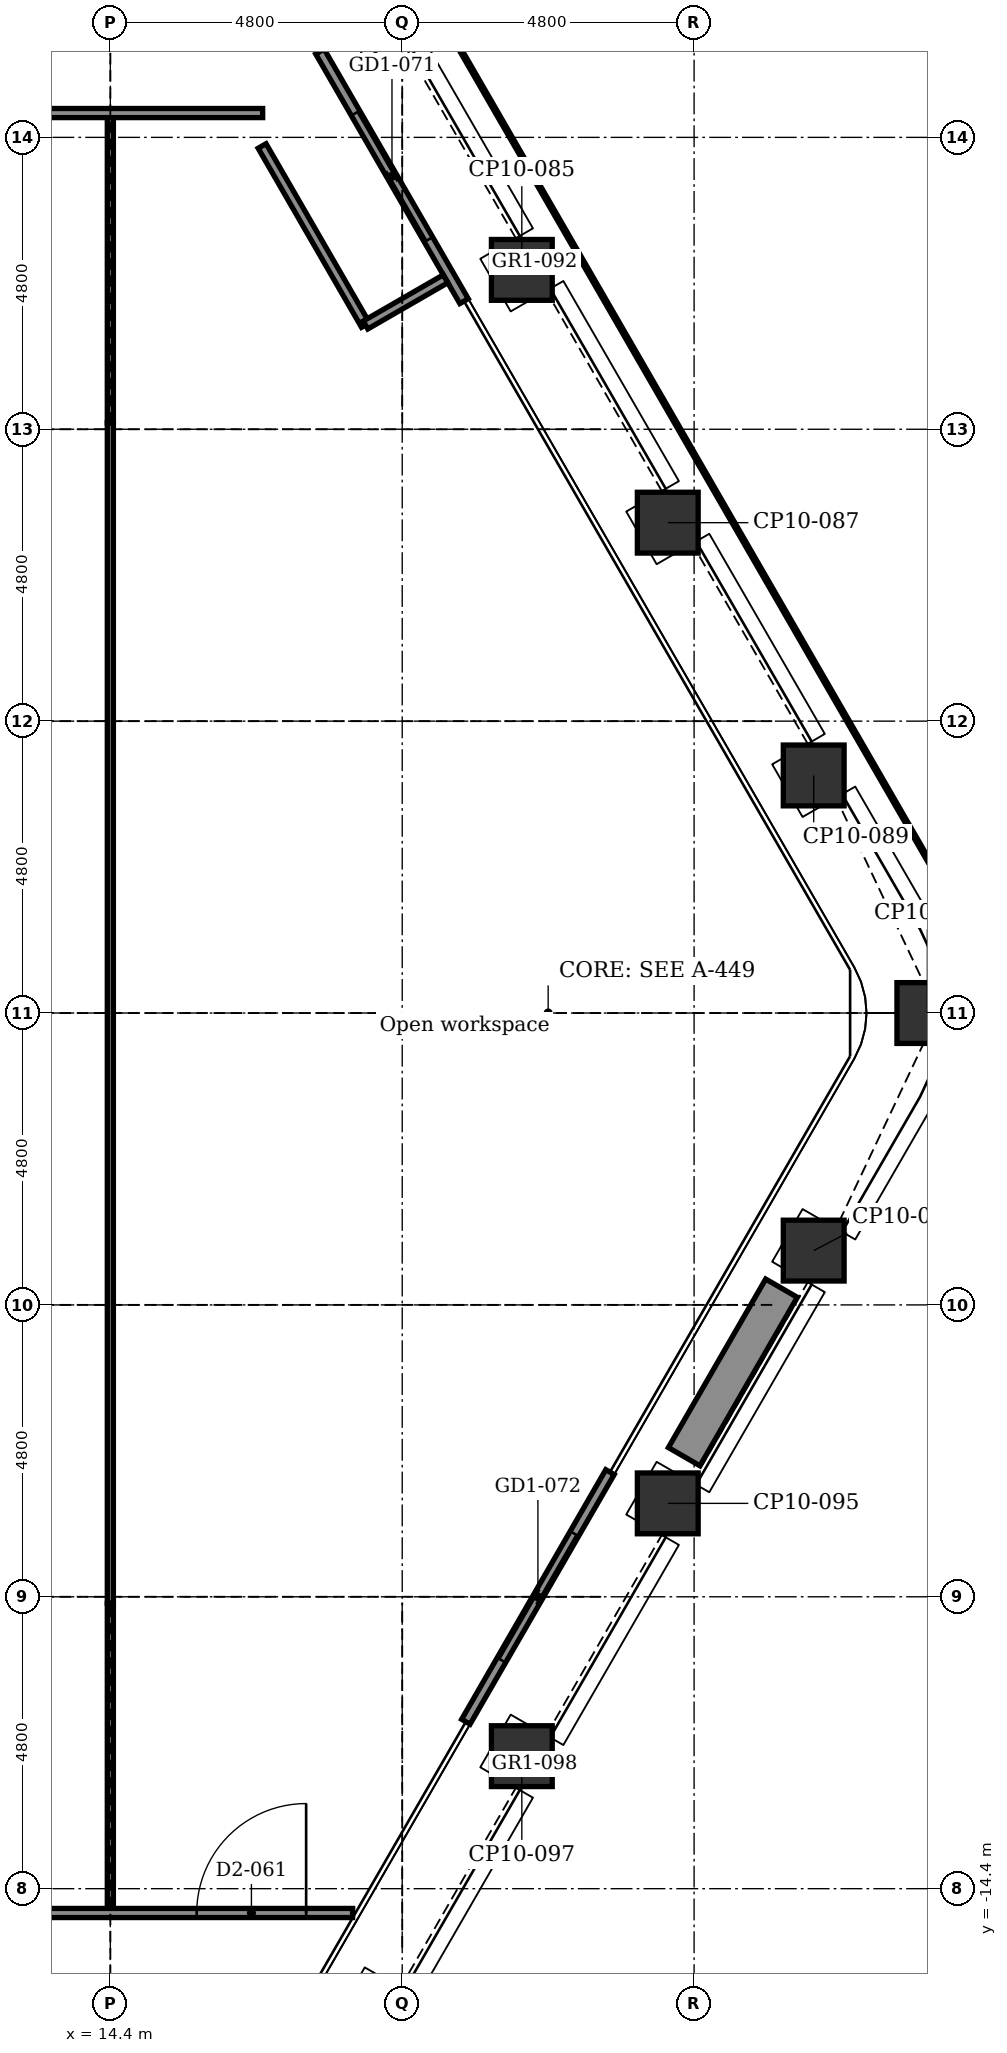
"""IFC4 building model, lengths in metres.
Left out: names, types, materials, properties, quantities, classifications, styles, units other than length and angle.
Written with IfcOpenShell. Run it as: python <this file> out.ifc"""

import sys

from ifc_helpers import new_model, si_unit, direction, frame, frame_2d, origin, origin_2d, place, context, subcontext, project, spatial, rectangle, extrude, element, fill, save


model = new_model("IFC4")
c1 = context("Model", 3, precision=1e-05, world=origin(), true_north=direction((0.0, 1.0)))
c2 = subcontext(c1, "Body", "Model", "MODEL_VIEW")
j1 = project(units=[si_unit("LENGTHUNIT", "METRE"), si_unit("PLANEANGLEUNIT", "RADIAN")], contexts=[c1])
p1 = place(None, origin())
s1 = spatial("IfcSite", under=j1, at=p1, CompositionType="ELEMENT")
p2 = place(p1, origin())
s2 = spatial("IfcBuilding", under=s1, at=p2, CompositionType="ELEMENT")
p3 = place(p2, frame((0.0, 0.0, 212.9)))
s3 = spatial("IfcBuildingStorey", under=s2, at=p3, CompositionType="ELEMENT", Elevation=212.9)
for number, where, z_axis, x_axis in (
    (1, (18.767, 16.378, -0.15), (0.0, 0.0, 1.0), (0.866, 0.5, 0.0)),
    (2, (21.167, 12.221, -0.15), (0.0, 0.0, 1.0), (0.866, 0.5, 0.0)),
    (3, (23.567, 8.064, -0.15), (0.0, 0.0, 1.0), (0.866, 0.5, 0.0)),
    (4, (25.967, 3.907, -0.15), (0.0, 0.0, 1.0), (0.866, 0.5, 0.0)),
    (5, (27.836, 0.0, -0.15), (0.0, 0.0, 1.0), (1.0, 0.0, 0.0)),
    (6, (25.967, -3.907, -0.15), (0.0, 0.0, 1.0), (0.5, 0.866, 0.0)),
    (7, (23.567, -8.064, -0.15), (0.0, 0.0, 1.0), (0.5, 0.866, 0.0)),
    (8, (21.167, -12.221, -0.15), (0.0, 0.0, 1.0), (0.5, 0.866, 0.0)),
    (9, (18.767, -16.378, -0.15), (0.0, 0.0, 1.0), (0.5, 0.866, 0.0)),
):
    element("IfcColumn", number, at=place(p3, frame(where, z_axis=z_axis, x_axis=x_axis)), inside=s3, PredefinedType="COLUMN", context=c2, shape_type="SweptSolid", body=[
        extrude(rectangle(XDim=1.0, YDim=1.0, at=origin_2d()), origin(), (0.0, 0.0, 1.0), 3.75),
    ])
p4 = place(p3, frame((17.847, 15.812, 0.0), z_axis=(0.0, 0.0, 1.0), x_axis=(0.5000167099, -0.866015756104, 0.0)))
e10 = element("IfcWall", 10, at=p4, inside=s3, PredefinedType="PARTITIONING", context=c2, shape_type="SweptSolid", body=[
    extrude(rectangle(XDim=4.74, YDim=0.16, at=frame_2d((2.37, 0.0))), origin(), (0.0, 0.0, 1.0), 3.6),
])
p5 = place(p4, frame((1.17, 0.0, 0.0)))
e11 = element("IfcOpeningElement", 11, at=p5, cuts=e10, PredefinedType="OPENING", context=c2, shape_type="SweptSolid", body=[
    extrude(rectangle(XDim=2.4, YDim=2.4, at=frame_2d((1.2, 1.2))), frame((0.0, 0.09, 0.0), z_axis=(0.0, -1.0, 0.0), x_axis=(1.0, 0.0, 0.0)), (0.0, 0.0, 1.0), 0.18),
])
p6 = place(p3, frame((22.617, -7.55, 0.0), z_axis=(0.0, 0.0, 1.0), x_axis=(-0.5000167099, -0.866015756104, 0.0)))
e12 = element("IfcWall", 12, at=p6, inside=s3, PredefinedType="PARTITIONING", context=c2, shape_type="SweptSolid", body=[
    extrude(rectangle(XDim=4.74, YDim=0.16, at=frame_2d((2.37, 0.0))), origin(), (0.0, 0.0, 1.0), 3.6),
])
p7 = place(p6, frame((1.17, 0.0, 0.0)))
e13 = element("IfcOpeningElement", 13, at=p7, cuts=e12, PredefinedType="OPENING", context=c2, shape_type="SweptSolid", body=[
    extrude(rectangle(XDim=2.4, YDim=2.4, at=frame_2d((1.2, 1.2))), frame((0.0, 0.09, 0.0), z_axis=(0.0, -1.0, 0.0), x_axis=(1.0, 0.0, 0.0)), (0.0, 0.0, 1.0), 0.18),
])
p8 = place(p3, frame((25.437, -4.525, 0.0), z_axis=(0.0, 0.0, 1.0), x_axis=(-0.499938187974, -0.866061088033, 0.0)))
e14 = element("IfcWall", 14, at=p8, inside=s3, PredefinedType="USERDEFINED", context=c2, shape_type="SweptSolid", body=[
    extrude(rectangle(XDim=3.2, YDim=0.6, at=frame_2d((1.6, 0.0))), origin(), (0.0, 0.0, 1.0), 0.7),
])
p9 = place(p3, frame((14.4, -9.706, 0.0), z_axis=(0.0, 0.0, 1.0), x_axis=(0.0, 1.0, 0.0)))
e15 = element("IfcWall", 15, at=p9, inside=s3, PredefinedType="PARTITIONING", context=c2, shape_type="SweptSolid", body=[
    extrude(rectangle(XDim=19.412, YDim=0.1, at=frame_2d((9.706, 0.0))), origin(), (0.0, 0.0, 1.0), 3.6),
])
for number, where, z_axis, x_axis in (
    (16, (14.4, -14.8, 0.0), (0.0, 0.0, 1.0), (0.0, 1.0, 0.0)),
    (17, (14.4, 9.706, 0.0), (0.0, 0.0, 1.0), (0.0, 1.0, 0.0)),
):
    element("IfcWall", number, at=place(p3, frame(where, z_axis=z_axis, x_axis=x_axis)), inside=s3, PredefinedType="PARTITIONING", context=c2, shape_type="SweptSolid", body=[
        extrude(rectangle(XDim=5.094, YDim=0.1, at=frame_2d((2.547, 0.0))), origin(), (0.0, 0.0, 1.0), 2.916),
    ])
p10 = place(p3, frame((16.896, 14.258, 0.0), z_axis=(0.0, 0.0, 1.0), x_axis=(0.499977295307, -0.866038511948, 0.0)))
e18 = element("IfcWall", 18, at=p10, inside=s3, PredefinedType="PARTITIONING", context=c2, shape_type="SweptSolid", body=[
    extrude(rectangle(XDim=3.4, YDim=0.15, at=frame_2d((1.7, 0.0))), origin(), (0.0, 0.0, 1.0), 3.6),
])
p11 = place(p3, frame((18.596, 11.314, 0.0), z_axis=(0.0, 0.0, 1.0), x_axis=(0.866030456496, 0.499991248344, 0.0)))
e19 = element("IfcWall", 19, at=p11, inside=s3, PredefinedType="PARTITIONING", context=c2, shape_type="SweptSolid", body=[
    extrude(rectangle(XDim=1.52, YDim=0.15, at=frame_2d((0.76, 0.0))), origin(), (0.0, 0.0, 1.0), 3.6),
])
p12 = place(p3, frame((5.4, -14.8, 0.0), z_axis=(0.0, 0.0, 1.0), x_axis=(1.0, 0.0, 0.0)))
e20 = element("IfcWall", 20, at=p12, inside=s3, PredefinedType="PARTITIONING", context=c2, shape_type="SweptSolid", body=[
    extrude(rectangle(XDim=12.985, YDim=0.15, at=frame_2d((6.492, 0.0))), origin(), (0.0, 0.0, 1.0), 3.6),
])
p13 = place(p12, frame((10.42, 0.0, 0.0)))
e21 = element("IfcOpeningElement", 21, at=p13, cuts=e20, PredefinedType="OPENING", context=c2, shape_type="SweptSolid", body=[
    extrude(rectangle(XDim=1.8, YDim=2.1, at=frame_2d((0.9, 1.05))), frame((0.0, 0.085, 0.0), z_axis=(0.0, -1.0, 0.0), x_axis=(1.0, 0.0, 0.0)), (0.0, 0.0, 1.0), 0.17),
])
p14 = place(p3, frame((-3.0, 14.8, 0.0), z_axis=(0.0, 0.0, 1.0), x_axis=(1.0, 0.0, 0.0)))
e22 = element("IfcWall", 22, at=p14, inside=s3, PredefinedType="PARTITIONING", context=c2, shape_type="SweptSolid", body=[
    extrude(rectangle(XDim=19.905, YDim=0.15, at=frame_2d((9.953, 0.0))), origin(), (0.0, 0.0, 1.0), 3.6),
])
p15 = place(p14, frame((4.95, 0.0, 0.0)))
e23 = element("IfcOpeningElement", 23, at=p15, cuts=e22, PredefinedType="OPENING", context=c2, shape_type="SweptSolid", body=[
    extrude(rectangle(XDim=0.9, YDim=2.1, at=frame_2d((0.45, 1.05))), frame((0.0, 0.085, 0.0), z_axis=(0.0, -1.0, 0.0), x_axis=(1.0, 0.0, 0.0)), (0.0, 0.0, 1.0), 0.17),
])
p16 = place(p14, frame((10.715, 0.0, 0.0)))
e24 = element("IfcOpeningElement", 24, at=p16, cuts=e22, PredefinedType="OPENING", context=c2, shape_type="SweptSolid", body=[
    extrude(rectangle(XDim=1.0, YDim=2.1, at=frame_2d((0.5, 1.05))), frame((0.0, 0.085, 0.0), z_axis=(0.0, -1.0, 0.0), x_axis=(1.0, 0.0, 0.0)), (0.0, 0.0, 1.0), 0.17),
])
p17 = place(p14, frame((13.485, 0.0, 0.0)))
e25 = element("IfcOpeningElement", 25, at=p17, cuts=e22, PredefinedType="OPENING", context=c2, shape_type="SweptSolid", body=[
    extrude(rectangle(XDim=1.0, YDim=2.1, at=frame_2d((0.5, 1.05))), frame((0.0, 0.085, 0.0), z_axis=(0.0, -1.0, 0.0), x_axis=(1.0, 0.0, 0.0)), (0.0, 0.0, 1.0), 0.17),
])
p18 = place(p5, origin())
e26 = element("IfcDoor", 26, at=p18, inside=s3, OperationType="DOUBLE_DOOR_SLIDING", PredefinedType="DOOR", context=c2, shape_type="SweptSolid", body=[
    extrude(rectangle(XDim=2.4, YDim=2.4, at=frame_2d((1.2, 1.2))), frame((0.0, 0.025, 0.0), z_axis=(0.0, -1.0, 0.0), x_axis=(1.0, 0.0, 0.0)), (0.0, 0.0, 1.0), 0.05),
])
fill(e11, e26)
p19 = place(p7, origin())
e27 = element("IfcDoor", 27, at=p19, inside=s3, OperationType="DOUBLE_DOOR_SLIDING", PredefinedType="DOOR", context=c2, shape_type="SweptSolid", body=[
    extrude(rectangle(XDim=2.4, YDim=2.4, at=frame_2d((1.2, 1.2))), frame((0.0, 0.025, 0.0), z_axis=(0.0, -1.0, 0.0), x_axis=(1.0, 0.0, 0.0)), (0.0, 0.0, 1.0), 0.05),
])
fill(e13, e27)
p20 = place(p13, origin())
e28 = element("IfcDoor", 28, at=p20, inside=s3, OperationType="SINGLE_SWING_RIGHT", PredefinedType="DOOR", context=c2, shape_type="SweptSolid", body=[
    extrude(rectangle(XDim=1.8, YDim=2.1, at=frame_2d((0.9, 1.05))), frame((0.0, 0.025, 0.0), z_axis=(0.0, -1.0, 0.0), x_axis=(1.0, 0.0, 0.0)), (0.0, 0.0, 1.0), 0.05),
])
fill(e21, e28)
save(model, sys.argv[1])
